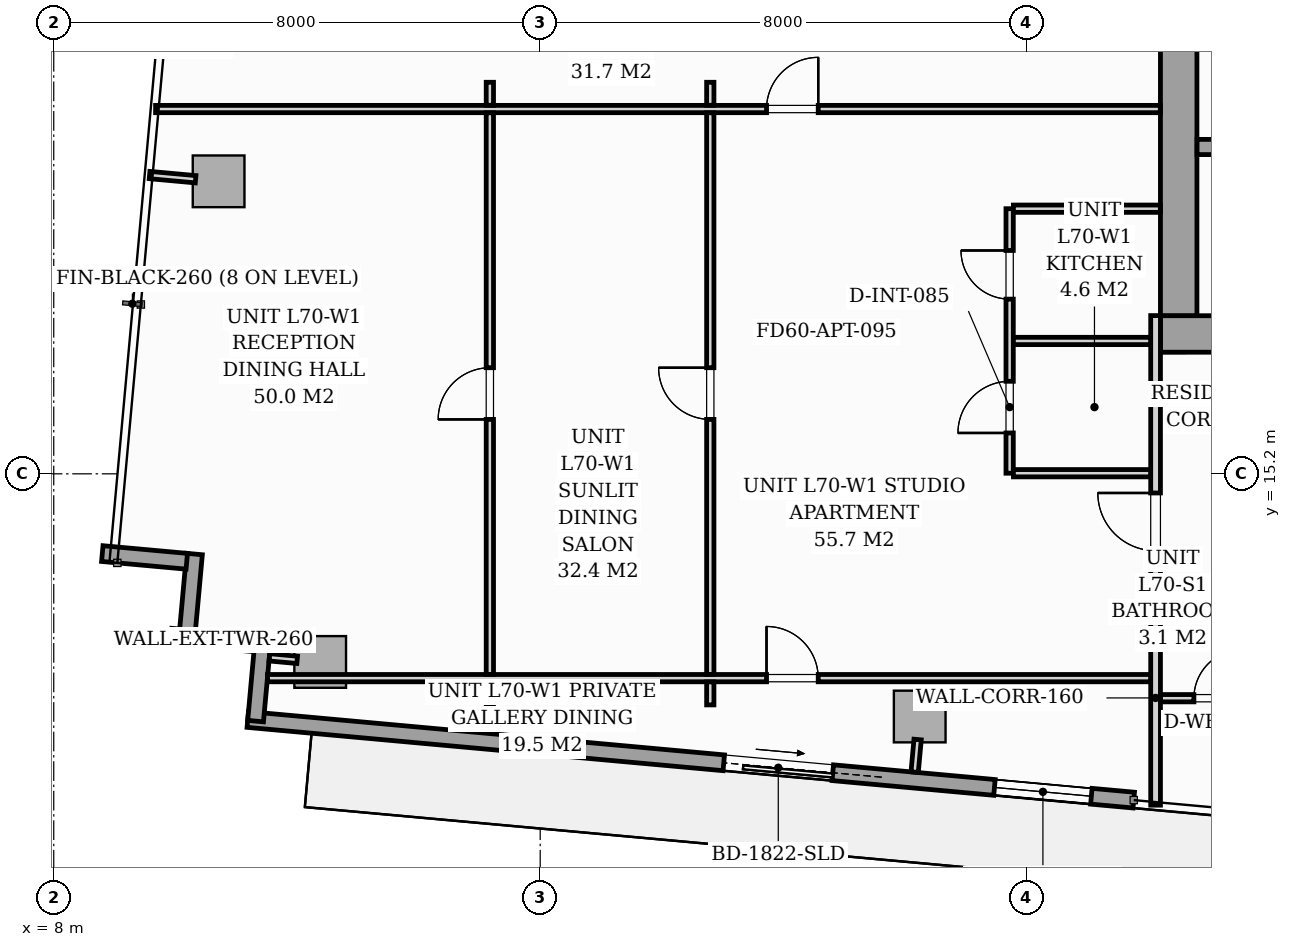
"""IFC4 building model, lengths in metres.
Left out: names, types, materials, properties, quantities, classifications, styles, units other than length and angle.
Written with IfcOpenShell. Run it as: python <this file> out.ifc"""

import sys

from ifc_helpers import new_model, si_unit, direction, frame, frame_2d, origin, origin_2d, place, context, subcontext, project, spatial, rectangle, i_section, extrude, source, transform, mapped, element, fill, save


model = new_model("IFC4")
c1 = context("Model", 3, precision=1e-05, world=origin(), true_north=direction((0.0, 1.0)))
c2 = subcontext(c1, "Body", "Model", "MODEL_VIEW")
j1 = project(units=[si_unit("LENGTHUNIT", "METRE"), si_unit("PLANEANGLEUNIT", "RADIAN")], contexts=[c1])
p1 = place(None, origin())
s1 = spatial("IfcSite", under=j1, at=p1, CompositionType="ELEMENT")
p2 = place(p1, origin())
s2 = spatial("IfcBuilding", under=s1, at=p2, CompositionType="ELEMENT")
p3 = place(p2, frame((0.0, 0.0, 243.0)))
s3 = spatial("IfcBuildingStorey", under=s2, at=p3, CompositionType="ELEMENT", Elevation=243.0)
m1 = source(origin(), c2, "Body", "SweptSolid", [
    extrude(i_section(OverallWidth=0.409, OverallDepth=0.425, WebThickness=0.033, FlangeThickness=0.052, FilletRadius=0.018, at=origin_2d()), origin(), (0.0, 0.0, 1.0), 3.296),
])
p4 = place(p3, frame((26.4, 17.4, 0.002), z_axis=(0.0, 0.0, 1.0), x_axis=(1.0, 0.0, 0.0)))
e1 = element("IfcColumn", 1, at=p4, inside=s3, PredefinedType="PILASTER", context=c2, shape_type="MappedRepresentation", body=[
    mapped(m1, transform((0.0, 0.0, 0.0), scale=1.0)),
])
m2 = source(origin(), c2, "Body", "SweptSolid", [
    extrude(rectangle(XDim=0.85, YDim=0.85, at=origin_2d()), origin(), (0.0, 0.0, 1.0), 3.296),
])
for number, where, z_axis, x_axis in (
    (2, (12.382, 12.106, 0.002), (0.0, 0.0, 1.0), (0.996, -0.091, 0.0)),
    (3, (22.241, 11.209, 0.002), (0.0, 0.0, 1.0), (0.996, -0.091, 0.0)),
    (4, (10.711, 20.01, 0.002), (0.0, 0.0, 1.0), (0.996, -0.091, 0.0)),
):
    element("IfcColumn", number, at=place(p3, frame(where, z_axis=z_axis, x_axis=x_axis)), inside=s3, PredefinedType="COLUMN", context=c2, shape_type="MappedRepresentation", body=[
        mapped(m2, transform((0.0, 0.0, 0.0), scale=1.0)),
    ])
p5 = place(p3, frame((11.319, 12.404, 0.0), z_axis=(0.0, 0.0, 1.0), x_axis=(-0.995881721538, 0.090661991521, 0.0)))
e5 = element("IfcWall", 5, at=p5, inside=s3, PredefinedType="STANDARD", context=c2, shape_type="SweptSolid", body=[
    extrude(rectangle(XDim=1.395, YDim=0.26, at=frame_2d((0.698, 0.0))), origin(), (0.0, 0.0, 1.0), 3.04),
])
p6 = place(p3, frame((10.188, 12.492, 0.0), z_axis=(0.0, 0.0, 1.0), x_axis=(0.090646191665, 0.995883159782, 0.0)))
e6 = element("IfcWall", 6, at=p6, inside=s3, PredefinedType="STANDARD", context=c2, shape_type="SweptSolid", body=[
    extrude(rectangle(XDim=1.395, YDim=0.26, at=frame_2d((0.698, 0.0))), origin(), (0.0, 0.0, 1.0), 3.04),
])
p7 = place(p3, frame((10.188, 13.762, 0.0), z_axis=(0.0, 0.0, 1.0), x_axis=(-0.995881721538, 0.090661991521, 0.0)))
e7 = element("IfcWall", 7, at=p7, inside=s3, PredefinedType="STANDARD", context=c2, shape_type="SweptSolid", body=[
    extrude(rectangle(XDim=1.395, YDim=0.26, at=frame_2d((0.698, 0.0))), origin(), (0.0, 0.0, 1.0), 3.04),
])
p8 = place(p3, frame((25.761, 9.834, 0.0), z_axis=(0.0, 0.0, 1.0), x_axis=(-0.995884584572, 0.090630536861, 0.0)))
e8 = element("IfcWall", 8, at=p8, inside=s3, PredefinedType="STANDARD", context=c2, shape_type="SweptSolid", body=[
    extrude(rectangle(XDim=14.63, YDim=0.26, at=frame_2d((7.315, 0.0))), origin(), (0.0, 0.0, 1.0), 3.04),
])
p9 = place(p8, frame((4.97, 0.0, 0.0)))
e9 = element("IfcOpeningElement", 9, at=p9, cuts=e8, PredefinedType="OPENING", context=c2, shape_type="SweptSolid", body=[
    extrude(rectangle(XDim=1.8, YDim=2.06, at=frame_2d((0.9, 1.03))), frame((0.0, 0.14, 0.0), z_axis=(0.0, -1.0, 0.0), x_axis=(1.0, 0.0, 0.0)), (0.0, 0.0, 1.0), 0.28),
])
p10 = place(p8, frame((0.7, 0.0, 0.65)))
e10 = element("IfcOpeningElement", 10, at=p10, cuts=e8, PredefinedType="OPENING", context=c2, shape_type="SweptSolid", body=[
    extrude(rectangle(XDim=1.6, YDim=1.5, at=frame_2d((0.8, 0.75))), frame((0.0, 0.14, 0.0), z_axis=(0.0, -1.0, 0.0), x_axis=(1.0, 0.0, 0.0)), (0.0, 0.0, 1.0), 0.28),
])
p11 = place(p3, frame((11.319, 11.134, 0.0), z_axis=(0.0, 0.0, 1.0), x_axis=(0.090661991521, 0.995881721538, 0.0)))
e11 = element("IfcWall", 11, at=p11, inside=s3, PredefinedType="STANDARD", context=c2, shape_type="SweptSolid", body=[
    extrude(rectangle(XDim=1.395, YDim=0.26, at=frame_2d((0.698, 0.0))), origin(), (0.0, 0.0, 1.0), 3.04),
])
p12 = place(p3, frame((26.2, 17.5, 0.0), z_axis=(0.0, 0.0, 1.0), x_axis=(1.0, 0.0, 0.0)))
e12 = element("IfcWall", 12, at=p12, inside=s3, PredefinedType="SHEAR", context=c2, shape_type="SweptSolid", body=[
    extrude(rectangle(XDim=19.6, YDim=0.6, at=frame_2d((9.8, 0.0))), origin(), (0.0, 0.0, 1.0), 3.3),
])
p13 = place(p12, frame((0.95, 0.0, 0.0)))
e13 = element("IfcOpeningElement", 13, at=p13, cuts=e12, PredefinedType="OPENING", context=c2, shape_type="SweptSolid", body=[
    extrude(rectangle(XDim=0.95, YDim=2.06, at=frame_2d((0.475, 1.03))), frame((0.0, 0.31, 0.0), z_axis=(0.0, -1.0, 0.0), x_axis=(1.0, 0.0, 0.0)), (0.0, 0.0, 1.0), 0.62),
])
p14 = place(p12, frame((9.38, 0.0, 0.0)))
e14 = element("IfcOpeningElement", 14, at=p14, cuts=e12, PredefinedType="OPENING", context=c2, shape_type="SweptSolid", body=[
    extrude(rectangle(XDim=0.85, YDim=2.0, at=frame_2d((0.425, 1.0))), frame((0.0, 0.31, 0.0), z_axis=(0.0, -1.0, 0.0), x_axis=(1.0, 0.0, 0.0)), (0.0, 0.0, 1.0), 0.62),
])
p15 = place(p12, frame((17.55, 0.0, 0.0)))
e15 = element("IfcOpeningElement", 15, at=p15, cuts=e12, PredefinedType="OPENING", context=c2, shape_type="SweptSolid", body=[
    extrude(rectangle(XDim=0.95, YDim=2.06, at=frame_2d((0.475, 1.03))), frame((0.0, 0.31, 0.0), z_axis=(0.0, -1.0, 0.0), x_axis=(1.0, 0.0, 0.0)), (0.0, 0.0, 1.0), 0.62),
])
p16 = place(p3, frame((26.5, 17.802, 0.0), z_axis=(0.0, 0.0, 1.0), x_axis=(0.0, 1.0, 0.0)))
e16 = element("IfcWall", 16, at=p16, inside=s3, PredefinedType="SHEAR", context=c2, shape_type="SweptSolid", body=[
    extrude(rectangle(XDim=5.796, YDim=0.6, at=frame_2d((2.898, 0.0))), origin(), (0.0, 0.0, 1.0), 3.3),
])
p17 = place(p3, frame((26.802, 20.575, 0.0), z_axis=(0.0, 0.0, 1.0), x_axis=(1.0, 0.0, 0.0)))
e17 = element("IfcWall", 17, at=p17, inside=s3, PredefinedType="SOLIDWALL", context=c2, shape_type="SweptSolid", body=[
    extrude(rectangle(XDim=8.148, YDim=0.25, at=frame_2d((4.074, 0.0))), origin(), (0.0, 0.0, 1.0), 3.3),
])
p18 = place(p17, frame((0.298, 0.0, 0.0)))
e18 = element("IfcOpeningElement", 18, at=p18, cuts=e17, PredefinedType="OPENING", context=c2, shape_type="SweptSolid", body=[
    extrude(rectangle(XDim=0.95, YDim=2.06, at=frame_2d((0.475, 1.03))), frame((0.0, 0.135, 0.0), z_axis=(0.0, -1.0, 0.0), x_axis=(1.0, 0.0, 0.0)), (0.0, 0.0, 1.0), 0.27),
])
p19 = place(p3, frame((26.12, 13.36, 0.0), z_axis=(0.0, 0.0, 1.0), x_axis=(1.0, 0.0, 0.0)))
e19 = element("IfcWall", 19, at=p19, inside=s3, PredefinedType="PARTITIONING", context=c2, shape_type="SweptSolid", body=[
    extrude(rectangle(XDim=19.76, YDim=0.16, at=frame_2d((9.88, 0.0))), origin(), (0.0, 0.0, 1.0), 2.55),
])
p20 = place(p19, frame((5.221, 0.0, 0.0)))
e20 = element("IfcOpeningElement", 20, at=p20, cuts=e19, PredefinedType="OPENING", context=c2, shape_type="SweptSolid", body=[
    extrude(rectangle(XDim=0.95, YDim=2.06, at=frame_2d((0.475, 1.03))), frame((0.0, 0.09, 0.0), z_axis=(0.0, -1.0, 0.0), x_axis=(1.0, 0.0, 0.0)), (0.0, 0.0, 1.0), 0.18),
])
p21 = place(p19, frame((8.074, 0.0, 0.0)))
e21 = element("IfcOpeningElement", 21, at=p21, cuts=e19, PredefinedType="OPENING", context=c2, shape_type="SweptSolid", body=[
    extrude(rectangle(XDim=0.95, YDim=2.06, at=frame_2d((0.475, 1.03))), frame((0.0, 0.09, 0.0), z_axis=(0.0, -1.0, 0.0), x_axis=(1.0, 0.0, 0.0)), (0.0, 0.0, 1.0), 0.18),
])
p22 = place(p19, frame((18.17, 0.0, 0.0)))
e22 = element("IfcOpeningElement", 22, at=p22, cuts=e19, PredefinedType="OPENING", context=c2, shape_type="SweptSolid", body=[
    extrude(rectangle(XDim=0.95, YDim=2.06, at=frame_2d((0.475, 1.03))), frame((0.0, 0.09, 0.0), z_axis=(0.0, -1.0, 0.0), x_axis=(1.0, 0.0, 0.0)), (0.0, 0.0, 1.0), 0.18),
])
p23 = place(p3, frame((26.12, 9.751, 0.0), z_axis=(0.0, 0.0, 1.0), x_axis=(0.0, 1.0, 0.0)))
e23 = element("IfcWall", 23, at=p23, inside=s3, PredefinedType="PARTITIONING", context=c2, shape_type="SweptSolid", body=[
    extrude(rectangle(XDim=3.527, YDim=0.16, at=frame_2d((1.763, 0.0))), origin(), (0.0, 0.0, 1.0), 3.04),
])
p24 = place(p3, frame((26.12, 13.442, 0.0), z_axis=(0.0, 0.0, 1.0), x_axis=(0.0, 1.0, 0.0)))
e24 = element("IfcWall", 24, at=p24, inside=s3, PredefinedType="PARTITIONING", context=c2, shape_type="SweptSolid", body=[
    extrude(rectangle(XDim=4.36, YDim=0.16, at=frame_2d((2.18, 0.0))), origin(), (0.0, 0.0, 1.0), 3.04),
])
p25 = place(p24, frame((0.493, 0.0, 0.0)))
e25 = element("IfcOpeningElement", 25, at=p25, cuts=e24, PredefinedType="OPENING", context=c2, shape_type="SweptSolid", body=[
    extrude(rectangle(XDim=0.95, YDim=2.06, at=frame_2d((0.475, 1.03))), frame((0.0, 0.09, 0.0), z_axis=(0.0, -1.0, 0.0), x_axis=(1.0, 0.0, 0.0)), (0.0, 0.0, 1.0), 0.18),
])
p26 = place(p3, frame((26.202, 11.51, 0.0), z_axis=(0.0, 0.0, 1.0), x_axis=(1.0, 0.0, 0.0)))
e26 = element("IfcWall", 26, at=p26, inside=s3, PredefinedType="PARTITIONING", context=c2, shape_type="SweptSolid", body=[
    extrude(rectangle(XDim=4.098, YDim=0.12, at=frame_2d((2.049, 0.0))), origin(), (0.0, 0.0, 1.0), 2.55),
])
p27 = place(p26, frame((0.548, 0.0, 0.0)))
e27 = element("IfcOpeningElement", 27, at=p27, cuts=e26, PredefinedType="OPENING", context=c2, shape_type="SweptSolid", body=[
    extrude(rectangle(XDim=0.8, YDim=2.02, at=frame_2d((0.4, 1.01))), frame((0.0, 0.07, 0.0), z_axis=(0.0, -1.0, 0.0), x_axis=(1.0, 0.0, 0.0)), (0.0, 0.0, 1.0), 0.14),
])
p28 = place(p26, frame((2.573, 0.0, 0.0)))
e28 = element("IfcOpeningElement", 28, at=p28, cuts=e26, PredefinedType="OPENING", context=c2, shape_type="SweptSolid", body=[
    extrude(rectangle(XDim=0.85, YDim=2.05, at=frame_2d((0.425, 1.025))), frame((0.0, 0.07, 0.0), z_axis=(0.0, -1.0, 0.0), x_axis=(1.0, 0.0, 0.0)), (0.0, 0.0, 1.0), 0.14),
])
p29 = place(p3, frame((23.72, 15.21, 0.0), z_axis=(0.0, 0.0, 1.0), x_axis=(0.0, 1.0, 0.0)))
e29 = element("IfcWall", 29, at=p29, inside=s3, PredefinedType="PARTITIONING", context=c2, shape_type="SweptSolid", body=[
    extrude(rectangle(XDim=4.35, YDim=0.12, at=frame_2d((2.175, 0.0))), origin(), (0.0, 0.0, 1.0), 3.04),
])
p30 = place(p29, frame((0.662, 0.0, 0.0)))
e30 = element("IfcOpeningElement", 30, at=p30, cuts=e29, PredefinedType="OPENING", context=c2, shape_type="SweptSolid", body=[
    extrude(rectangle(XDim=0.85, YDim=2.05, at=frame_2d((0.425, 1.025))), frame((0.0, 0.07, 0.0), z_axis=(0.0, -1.0, 0.0), x_axis=(1.0, 0.0, 0.0)), (0.0, 0.0, 1.0), 0.14),
])
p31 = place(p29, frame((2.863, 0.0, 0.0)))
e31 = element("IfcOpeningElement", 31, at=p31, cuts=e29, PredefinedType="OPENING", context=c2, shape_type="SweptSolid", body=[
    extrude(rectangle(XDim=0.8, YDim=2.02, at=frame_2d((0.4, 1.01))), frame((0.0, 0.07, 0.0), z_axis=(0.0, -1.0, 0.0), x_axis=(1.0, 0.0, 0.0)), (0.0, 0.0, 1.0), 0.14),
])
p32 = place(p3, frame((23.782, 17.385, 0.0), z_axis=(0.0, 0.0, 1.0), x_axis=(1.0, 0.0, 0.0)))
e32 = element("IfcWall", 32, at=p32, inside=s3, PredefinedType="PARTITIONING", context=c2, shape_type="SweptSolid", body=[
    extrude(rectangle(XDim=2.256, YDim=0.12, at=frame_2d((1.128, 0.0))), origin(), (0.0, 0.0, 1.0), 2.381),
])
p33 = place(p3, frame((23.782, 15.21, 0.0), z_axis=(0.0, 0.0, 1.0), x_axis=(1.0, 0.0, 0.0)))
e33 = element("IfcWall", 33, at=p33, inside=s3, PredefinedType="PARTITIONING", context=c2, shape_type="SweptSolid", body=[
    extrude(rectangle(XDim=2.256, YDim=0.12, at=frame_2d((1.128, 0.0))), origin(), (0.0, 0.0, 1.0), 3.04),
])
p34 = place(p3, frame((23.782, 19.56, 0.0), z_axis=(0.0, 0.0, 1.0), x_axis=(1.0, 0.0, 0.0)))
e34 = element("IfcWall", 34, at=p34, inside=s3, PredefinedType="PARTITIONING", context=c2, shape_type="SweptSolid", body=[
    extrude(rectangle(XDim=2.416, YDim=0.12, at=frame_2d((1.208, 0.0))), origin(), (0.0, 0.0, 1.0), 3.04),
])
p35 = place(p3, frame((11.516, 11.84, 0.0), z_axis=(0.0, 0.0, 1.0), x_axis=(1.0, 0.0, 0.0)))
e35 = element("IfcWall", 35, at=p35, inside=s3, PredefinedType="PARTITIONING", context=c2, shape_type="SweptSolid", body=[
    extrude(rectangle(XDim=14.522, YDim=0.12, at=frame_2d((7.261, 0.0))), origin(), (0.0, 0.0, 1.0), 2.482),
])
p36 = place(p35, frame((8.206, 0.0, 0.0)))
e36 = element("IfcOpeningElement", 36, at=p36, cuts=e35, PredefinedType="OPENING", context=c2, shape_type="SweptSolid", body=[
    extrude(rectangle(XDim=0.85, YDim=2.05, at=frame_2d((0.425, 1.025))), frame((0.0, 0.07, 0.0), z_axis=(0.0, -1.0, 0.0), x_axis=(1.0, 0.0, 0.0)), (0.0, 0.0, 1.0), 0.14),
])
p37 = place(p3, frame((9.675, 21.199, 0.0), z_axis=(0.0, 0.0, 1.0), x_axis=(1.0, 0.0, 0.0)))
e37 = element("IfcWall", 37, at=p37, inside=s3, PredefinedType="PARTITIONING", context=c2, shape_type="SweptSolid", body=[
    extrude(rectangle(XDim=16.523, YDim=0.12, at=frame_2d((8.262, 0.0))), origin(), (0.0, 0.0, 1.0), 3.04),
])
p38 = place(p37, frame((10.047, 0.0, 0.0)))
e38 = element("IfcOpeningElement", 38, at=p38, cuts=e37, PredefinedType="OPENING", context=c2, shape_type="SweptSolid", body=[
    extrude(rectangle(XDim=0.85, YDim=2.05, at=frame_2d((0.425, 1.025))), frame((0.0, 0.07, 0.0), z_axis=(0.0, -1.0, 0.0), x_axis=(1.0, 0.0, 0.0)), (0.0, 0.0, 1.0), 0.14),
])
p39 = place(p3, frame((15.172, 11.4, 0.0), z_axis=(0.0, 0.0, 1.0), x_axis=(0.0, 1.0, 0.0)))
e39 = element("IfcWall", 39, at=p39, inside=s3, PredefinedType="PARTITIONING", context=c2, shape_type="SweptSolid", body=[
    extrude(rectangle(XDim=0.378, YDim=0.12, at=frame_2d((0.189, 0.0))), origin(), (0.0, 0.0, 1.0), 3.04),
])
p40 = place(p3, frame((15.172, 11.902, 0.0), z_axis=(0.0, 0.0, 1.0), x_axis=(0.0, 1.0, 0.0)))
e40 = element("IfcWall", 40, at=p40, inside=s3, PredefinedType="PARTITIONING", context=c2, shape_type="SweptSolid", body=[
    extrude(rectangle(XDim=9.235, YDim=0.12, at=frame_2d((4.617, 0.0))), origin(), (0.0, 0.0, 1.0), 3.04),
])
p41 = place(p40, frame((4.193, 0.0, 0.0)))
e41 = element("IfcOpeningElement", 41, at=p41, cuts=e40, PredefinedType="OPENING", context=c2, shape_type="SweptSolid", body=[
    extrude(rectangle(XDim=0.85, YDim=2.05, at=frame_2d((0.425, 1.025))), frame((0.0, 0.07, 0.0), z_axis=(0.0, -1.0, 0.0), x_axis=(1.0, 0.0, 0.0)), (0.0, 0.0, 1.0), 0.14),
])
p42 = place(p3, frame((15.172, 21.261, 0.0), z_axis=(0.0, 0.0, 1.0), x_axis=(0.0, 1.0, 0.0)))
e42 = element("IfcWall", 42, at=p42, inside=s3, PredefinedType="PARTITIONING", context=c2, shape_type="SweptSolid", body=[
    extrude(rectangle(XDim=0.378, YDim=0.12, at=frame_2d((0.189, 0.0))), origin(), (0.0, 0.0, 1.0), 3.04),
])
p43 = place(p3, frame((18.797, 11.4, 0.0), z_axis=(0.0, 0.0, 1.0), x_axis=(0.0, 1.0, 0.0)))
e43 = element("IfcWall", 43, at=p43, inside=s3, PredefinedType="PARTITIONING", context=c2, shape_type="SweptSolid", body=[
    extrude(rectangle(XDim=0.378, YDim=0.12, at=frame_2d((0.189, 0.0))), origin(), (0.0, 0.0, 1.0), 3.04),
])
p44 = place(p3, frame((18.797, 11.902, 0.0), z_axis=(0.0, 0.0, 1.0), x_axis=(0.0, 1.0, 0.0)))
e44 = element("IfcWall", 44, at=p44, inside=s3, PredefinedType="PARTITIONING", context=c2, shape_type="SweptSolid", body=[
    extrude(rectangle(XDim=9.235, YDim=0.12, at=frame_2d((4.617, 0.0))), origin(), (0.0, 0.0, 1.0), 3.04),
])
p45 = place(p44, frame((4.193, 0.0, 0.0)))
e45 = element("IfcOpeningElement", 45, at=p45, cuts=e44, PredefinedType="OPENING", context=c2, shape_type="SweptSolid", body=[
    extrude(rectangle(XDim=0.85, YDim=2.05, at=frame_2d((0.425, 1.025))), frame((0.0, 0.07, 0.0), z_axis=(0.0, -1.0, 0.0), x_axis=(1.0, 0.0, 0.0)), (0.0, 0.0, 1.0), 0.14),
])
p46 = place(p3, frame((18.797, 21.261, 0.0), z_axis=(0.0, 0.0, 1.0), x_axis=(0.0, 1.0, 0.0)))
e46 = element("IfcWall", 46, at=p46, inside=s3, PredefinedType="PARTITIONING", context=c2, shape_type="SweptSolid", body=[
    extrude(rectangle(XDim=0.378, YDim=0.12, at=frame_2d((0.189, 0.0))), origin(), (0.0, 0.0, 1.0), 3.04),
])
p47 = place(p3, frame((12.003, 12.141, 0.0), z_axis=(0.0, 0.0, 1.0), x_axis=(-0.995884462012, 0.090631883588, 0.0)))
e47 = element("IfcWall", 47, at=p47, inside=s3, PredefinedType="PARTITIONING", context=c2, shape_type="SweptSolid", body=[
    extrude(rectangle(XDim=0.458, YDim=0.12, at=frame_2d((0.229, 0.0))), origin(), (0.0, 0.0, 1.0), 3.04),
])
p48 = place(p3, frame((22.207, 10.831, 0.0), z_axis=(0.0, 0.0, 1.0), x_axis=(-0.090781299264, -0.995870852924, 0.0)))
e48 = element("IfcWall", 48, at=p48, inside=s3, PredefinedType="PARTITIONING", context=c2, shape_type="SweptSolid", body=[
    extrude(rectangle(XDim=0.538, YDim=0.12, at=frame_2d((0.269, 0.0))), origin(), (0.0, 0.0, 1.0), 3.04),
])
p49 = place(p3, frame((10.333, 20.045, 0.0), z_axis=(0.0, 0.0, 1.0), x_axis=(-0.995890573658, 0.09056470228, 0.0)))
e49 = element("IfcWall", 49, at=p49, inside=s3, PredefinedType="PARTITIONING", context=c2, shape_type="SweptSolid", body=[
    extrude(rectangle(XDim=0.76, YDim=0.12, at=frame_2d((0.38, 0.0))), origin(), (0.0, 0.0, 1.0), 3.04),
])
m3 = source(origin(), c2, "Body", "SweptSolid", [
    extrude(rectangle(XDim=1.8, YDim=2.06, at=frame_2d((0.9, 1.03))), frame((0.0, 0.025, 0.0), z_axis=(0.0, -1.0, 0.0), x_axis=(1.0, 0.0, 0.0)), (0.0, 0.0, 1.0), 0.05),
])
p50 = place(p9, origin())
e50 = element("IfcDoor", 50, at=p50, inside=s3, OperationType="SLIDING_TO_LEFT", PredefinedType="DOOR", context=c2, shape_type="MappedRepresentation", body=[
    mapped(m3, transform((0.0, 0.0, 0.0), scale=1.0)),
])
fill(e9, e50)
m4 = source(origin(), c2, "Body", "SweptSolid", [
    extrude(rectangle(XDim=1.6, YDim=1.5, at=frame_2d((0.8, 0.75))), frame((0.0, 0.03, 0.0), z_axis=(0.0, -1.0, 0.0), x_axis=(1.0, 0.0, 0.0)), (0.0, 0.0, 1.0), 0.06),
])
p51 = place(p10, origin())
e51 = element("IfcWindow", 51, at=p51, inside=s3, PartitioningType="SINGLE_PANEL", PredefinedType="WINDOW", context=c2, shape_type="MappedRepresentation", body=[
    mapped(m4, transform((0.0, 0.0, 0.0), scale=1.0)),
])
fill(e10, e51)
m5 = source(origin(), c2, "Body", "SweptSolid", [
    extrude(rectangle(XDim=0.8, YDim=2.02, at=frame_2d((0.4, 1.01))), frame((0.0, 0.025, 0.0), z_axis=(0.0, -1.0, 0.0), x_axis=(1.0, 0.0, 0.0)), (0.0, 0.0, 1.0), 0.05),
])
p52 = place(p27, origin())
e52 = element("IfcDoor", 52, at=p52, inside=s3, OperationType="SINGLE_SWING_RIGHT", PredefinedType="DOOR", context=c2, shape_type="MappedRepresentation", body=[
    mapped(m5, transform((0.0, 0.0, 0.0), scale=1.0)),
])
fill(e27, e52)
m6 = source(origin(), c2, "Body", "SweptSolid", [
    extrude(rectangle(XDim=0.95, YDim=2.06, at=frame_2d((0.475, 1.03))), frame((0.0, 0.025, 0.0), z_axis=(0.0, -1.0, 0.0), x_axis=(1.0, 0.0, 0.0)), (0.0, 0.0, 1.0), 0.05),
])
p53 = place(p25, origin())
e53 = element("IfcDoor", 53, at=p53, inside=s3, OperationType="SINGLE_SWING_RIGHT", PredefinedType="DOOR", context=c2, shape_type="MappedRepresentation", body=[
    mapped(m6, transform((0.0, 0.0, 0.0), scale=1.0)),
])
fill(e25, e53)
m7 = source(origin(), c2, "Body", "SweptSolid", [
    extrude(rectangle(XDim=0.85, YDim=2.05, at=frame_2d((0.425, 1.025))), frame((0.0, 0.025, 0.0), z_axis=(0.0, -1.0, 0.0), x_axis=(1.0, 0.0, 0.0)), (0.0, 0.0, 1.0), 0.05),
])
p54 = place(p30, origin())
e54 = element("IfcDoor", 54, at=p54, inside=s3, OperationType="SINGLE_SWING_LEFT", PredefinedType="DOOR", context=c2, shape_type="MappedRepresentation", body=[
    mapped(m7, transform((0.0, 0.0, 0.0), scale=1.0)),
])
fill(e30, e54)
p55 = place(p31, origin())
e55 = element("IfcDoor", 55, at=p55, inside=s3, OperationType="SINGLE_SWING_RIGHT", PredefinedType="DOOR", context=c2, shape_type="MappedRepresentation", body=[
    mapped(m5, transform((0.0, 0.0, 0.0), scale=1.0)),
])
fill(e31, e55)
p56 = place(p36, origin())
e56 = element("IfcDoor", 56, at=p56, inside=s3, OperationType="SINGLE_SWING_LEFT", PredefinedType="DOOR", context=c2, shape_type="MappedRepresentation", body=[
    mapped(m7, transform((0.0, 0.0, 0.0), scale=1.0)),
])
fill(e36, e56)
p57 = place(p38, origin())
e57 = element("IfcDoor", 57, at=p57, inside=s3, OperationType="SINGLE_SWING_RIGHT", PredefinedType="DOOR", context=c2, shape_type="MappedRepresentation", body=[
    mapped(m7, transform((0.0, 0.0, 0.0), scale=1.0)),
])
fill(e38, e57)
p58 = place(p41, origin())
e58 = element("IfcDoor", 58, at=p58, inside=s3, OperationType="SINGLE_SWING_LEFT", PredefinedType="DOOR", context=c2, shape_type="MappedRepresentation", body=[
    mapped(m7, transform((0.0, 0.0, 0.0), scale=1.0)),
])
fill(e41, e58)
p59 = place(p45, origin())
e59 = element("IfcDoor", 59, at=p59, inside=s3, OperationType="SINGLE_SWING_RIGHT", PredefinedType="DOOR", context=c2, shape_type="MappedRepresentation", body=[
    mapped(m7, transform((0.0, 0.0, 0.0), scale=1.0)),
])
fill(e45, e59)
save(model, sys.argv[1])
